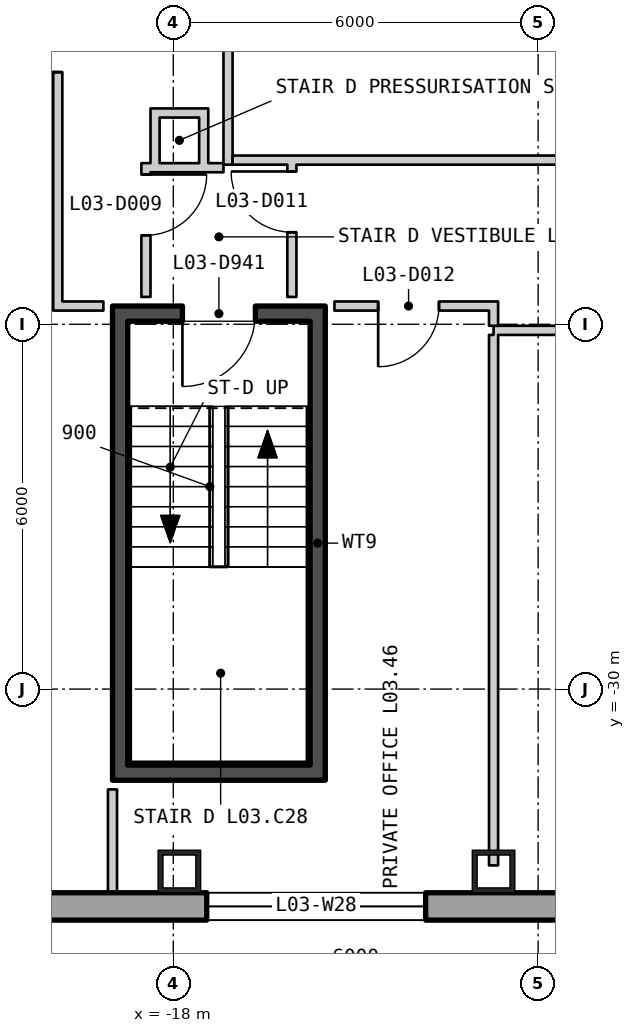
"""IFC4 building model, lengths in metres.
Left out: names, types, materials, properties, quantities, classifications, styles, units other than length and angle.
Written with IfcOpenShell. Run it as: python <this file> out.ifc"""

import sys

from ifc_helpers import new_model, si_unit, direction, frame, frame_2d, origin, origin_2d, place, context, subcontext, project, spatial, polyline, rectangle, hollow_rectangle, outline, extrude, element, fill, save


model = new_model("IFC4")
c1 = context("Model", 3, precision=1e-05, world=origin(), true_north=direction((0.0, 1.0)))
c2 = subcontext(c1, "Body", "Model", "MODEL_VIEW")
j1 = project(units=[si_unit("LENGTHUNIT", "METRE"), si_unit("PLANEANGLEUNIT", "RADIAN")], contexts=[c1])
p1 = place(None, origin())
s1 = spatial("IfcSite", under=j1, at=p1, CompositionType="ELEMENT")
p2 = place(p1, origin())
s2 = spatial("IfcBuilding", under=s1, at=p2, CompositionType="ELEMENT")
p3 = place(p2, frame((0.0, 0.0, 18.6)))
s3 = spatial("IfcBuildingStorey", under=s2, at=p3, CompositionType="ELEMENT", Elevation=18.6)
for number, where, z_axis, x_axis in (
    (1, (-17.9, -33.0, 0.0), (0.0, 0.0, 1.0), (1.0, 0.0, 0.0)),
    (2, (-12.733, -33.0, 0.0), (0.0, 0.0, 1.0), (1.0, 0.0, 0.0)),
):
    element("IfcColumn", number, at=place(p3, frame(where, z_axis=z_axis, x_axis=x_axis)), inside=s3, PredefinedType="COLUMN", context=c2, shape_type="SweptSolid", body=[
        extrude(hollow_rectangle(XDim=0.7, YDim=0.7, WallThickness=0.08, at=origin_2d()), origin(), (0.0, 0.0, 1.0), 5.1),
    ])
p4 = place(p3, frame((-38.775, -33.575, -0.4), z_axis=(0.0, 0.0, 1.0), x_axis=(1.0, 0.0, 0.0)))
e3 = element("IfcWall", 3, at=p4, inside=s3, PredefinedType="SOLIDWALL", context=c2, shape_type="SweptSolid", body=[
    extrude(outline(polyline([(-0.225, -0.225), (77.775, -0.225), (77.325, 0.225), (0.225, 0.225), (-0.225, -0.225)])), origin(), (0.0, 0.0, 1.0), 5.1),
])
p5 = place(p4, frame((1.958, 0.0, 1.3)))
e4 = element("IfcOpeningElement", 4, at=p5, cuts=e3, PredefinedType="OPENING", context=c2, shape_type="SweptSolid", body=[
    extrude(rectangle(XDim=3.6, YDim=3.2, at=frame_2d((1.8, 1.6))), frame((0.0, 0.235, 0.0), z_axis=(0.0, -1.0, 0.0), x_axis=(1.0, 0.0, 0.0)), (0.0, 0.0, 1.0), 0.47),
])
p6 = place(p4, frame((8.325, 0.0, 1.3)))
e5 = element("IfcOpeningElement", 5, at=p6, cuts=e3, PredefinedType="OPENING", context=c2, shape_type="SweptSolid", body=[
    extrude(rectangle(XDim=3.6, YDim=3.2, at=frame_2d((1.8, 1.6))), frame((0.0, 0.235, 0.0), z_axis=(0.0, -1.0, 0.0), x_axis=(1.0, 0.0, 0.0)), (0.0, 0.0, 1.0), 0.47),
])
p7 = place(p4, frame((14.692, 0.0, 1.3)))
e6 = element("IfcOpeningElement", 6, at=p7, cuts=e3, PredefinedType="OPENING", context=c2, shape_type="SweptSolid", body=[
    extrude(rectangle(XDim=3.6, YDim=3.2, at=frame_2d((1.8, 1.6))), frame((0.0, 0.235, 0.0), z_axis=(0.0, -1.0, 0.0), x_axis=(1.0, 0.0, 0.0)), (0.0, 0.0, 1.0), 0.47),
])
p8 = place(p4, frame((21.325, 0.0, 1.3)))
e7 = element("IfcOpeningElement", 7, at=p8, cuts=e3, PredefinedType="OPENING", context=c2, shape_type="SweptSolid", body=[
    extrude(rectangle(XDim=3.6, YDim=3.2, at=frame_2d((1.8, 1.6))), frame((0.0, 0.235, 0.0), z_axis=(0.0, -1.0, 0.0), x_axis=(1.0, 0.0, 0.0)), (0.0, 0.0, 1.0), 0.47),
])
p9 = place(p4, frame((27.425, 0.0, 1.3)))
e8 = element("IfcOpeningElement", 8, at=p9, cuts=e3, PredefinedType="OPENING", context=c2, shape_type="SweptSolid", body=[
    extrude(rectangle(XDim=3.6, YDim=3.2, at=frame_2d((1.8, 1.6))), frame((0.0, 0.235, 0.0), z_axis=(0.0, -1.0, 0.0), x_axis=(1.0, 0.0, 0.0)), (0.0, 0.0, 1.0), 0.47),
])
p10 = place(p4, frame((33.792, 0.0, 1.3)))
e9 = element("IfcOpeningElement", 9, at=p10, cuts=e3, PredefinedType="OPENING", context=c2, shape_type="SweptSolid", body=[
    extrude(rectangle(XDim=3.6, YDim=3.2, at=frame_2d((1.8, 1.6))), frame((0.0, 0.235, 0.0), z_axis=(0.0, -1.0, 0.0), x_axis=(1.0, 0.0, 0.0)), (0.0, 0.0, 1.0), 0.47),
])
p11 = place(p4, frame((40.158, 0.0, 1.3)))
e10 = element("IfcOpeningElement", 10, at=p11, cuts=e3, PredefinedType="OPENING", context=c2, shape_type="SweptSolid", body=[
    extrude(rectangle(XDim=3.6, YDim=3.2, at=frame_2d((1.8, 1.6))), frame((0.0, 0.235, 0.0), z_axis=(0.0, -1.0, 0.0), x_axis=(1.0, 0.0, 0.0)), (0.0, 0.0, 1.0), 0.47),
])
p12 = place(p4, frame((46.525, 0.0, 1.3)))
e11 = element("IfcOpeningElement", 11, at=p12, cuts=e3, PredefinedType="OPENING", context=c2, shape_type="SweptSolid", body=[
    extrude(rectangle(XDim=3.6, YDim=3.2, at=frame_2d((1.8, 1.6))), frame((0.0, 0.235, 0.0), z_axis=(0.0, -1.0, 0.0), x_axis=(1.0, 0.0, 0.0)), (0.0, 0.0, 1.0), 0.47),
])
p13 = place(p4, frame((52.625, 0.0, 1.3)))
e12 = element("IfcOpeningElement", 12, at=p13, cuts=e3, PredefinedType="OPENING", context=c2, shape_type="SweptSolid", body=[
    extrude(rectangle(XDim=3.6, YDim=3.2, at=frame_2d((1.8, 1.6))), frame((0.0, 0.235, 0.0), z_axis=(0.0, -1.0, 0.0), x_axis=(1.0, 0.0, 0.0)), (0.0, 0.0, 1.0), 0.47),
])
p14 = place(p4, frame((59.258, 0.0, 1.3)))
e13 = element("IfcOpeningElement", 13, at=p14, cuts=e3, PredefinedType="OPENING", context=c2, shape_type="SweptSolid", body=[
    extrude(rectangle(XDim=3.6, YDim=3.2, at=frame_2d((1.8, 1.6))), frame((0.0, 0.235, 0.0), z_axis=(0.0, -1.0, 0.0), x_axis=(1.0, 0.0, 0.0)), (0.0, 0.0, 1.0), 0.47),
])
p15 = place(p4, frame((65.625, 0.0, 1.3)))
e14 = element("IfcOpeningElement", 14, at=p15, cuts=e3, PredefinedType="OPENING", context=c2, shape_type="SweptSolid", body=[
    extrude(rectangle(XDim=3.6, YDim=3.2, at=frame_2d((1.8, 1.6))), frame((0.0, 0.235, 0.0), z_axis=(0.0, -1.0, 0.0), x_axis=(1.0, 0.0, 0.0)), (0.0, 0.0, 1.0), 0.47),
])
p16 = place(p4, frame((71.992, 0.0, 1.3)))
e15 = element("IfcOpeningElement", 15, at=p16, cuts=e3, PredefinedType="OPENING", context=c2, shape_type="SweptSolid", body=[
    extrude(rectangle(XDim=3.6, YDim=3.2, at=frame_2d((1.8, 1.6))), frame((0.0, 0.235, 0.0), z_axis=(0.0, -1.0, 0.0), x_axis=(1.0, 0.0, 0.0)), (0.0, 0.0, 1.0), 0.47),
])
for number, where, z_axis, x_axis in (
    (16, (-18.875, -31.25, 0.0), (0.0, 0.0, 1.0), (0.0, 1.0, 0.0)),
    (17, (-15.625, -31.25, 0.0), (0.0, 0.0, 1.0), (0.0, 1.0, 0.0)),
):
    element("IfcWall", number, at=place(p3, frame(where, z_axis=z_axis, x_axis=x_axis)), inside=s3, PredefinedType="SHEAR", context=c2, shape_type="SweptSolid", body=[
        extrude(rectangle(XDim=7.3, YDim=0.25, at=frame_2d((3.65, 0.0))), origin(), (0.0, 0.0, 1.0), 4.88),
    ])
p17 = place(p3, frame((-19.0, -31.375, 0.0), z_axis=(0.0, 0.0, 1.0), x_axis=(1.0, 0.0, 0.0)))
e18 = element("IfcWall", 18, at=p17, inside=s3, PredefinedType="SHEAR", context=c2, shape_type="SweptSolid", body=[
    extrude(rectangle(XDim=3.5, YDim=0.25, at=frame_2d((1.75, 0.0))), origin(), (0.0, 0.0, 1.0), 4.88),
])
p18 = place(p3, frame((-19.0, -23.825, 0.0), z_axis=(0.0, 0.0, 1.0), x_axis=(1.0, 0.0, 0.0)))
e19 = element("IfcWall", 19, at=p18, inside=s3, PredefinedType="SHEAR", context=c2, shape_type="SweptSolid", body=[
    extrude(rectangle(XDim=3.5, YDim=0.25, at=frame_2d((1.75, 0.0))), origin(), (0.0, 0.0, 1.0), 4.88),
])
p19 = place(p18, frame((1.15, 0.0, 0.0)))
e20 = element("IfcOpeningElement", 20, at=p19, cuts=e19, PredefinedType="OPENING", context=c2, shape_type="SweptSolid", body=[
    extrude(rectangle(XDim=1.2, YDim=2.1, at=frame_2d((0.6, 1.05))), frame((0.0, 0.135, 0.0), z_axis=(0.0, -1.0, 0.0), x_axis=(1.0, 0.0, 0.0)), (0.0, 0.0, 1.0), 0.27),
])
p20 = place(p3, frame((-25.026, -19.825, 0.0), z_axis=(0.0, 0.0, 1.0), x_axis=(0.707106781187, 0.707106781187, 0.0)))
e21 = element("IfcWall", 21, at=p20, inside=s3, PredefinedType="PARTITIONING", context=c2, shape_type="SweptSolid", body=[
    extrude(rectangle(XDim=7.068, YDim=0.15, at=frame_2d((3.534, 0.0))), origin(), (0.0, 0.0, 1.0), 4.88),
])
p21 = place(p3, frame((-19.9, -23.775, 0.0), z_axis=(0.0, 0.0, 1.0), x_axis=(0.0, 1.0, 0.0)))
e22 = element("IfcWall", 22, at=p21, inside=s3, PredefinedType="PARTITIONING", context=c2, shape_type="SweptSolid", body=[
    extrude(rectangle(XDim=21.187, YDim=0.15, at=frame_2d((10.594, 0.0))), origin(), (0.0, 0.0, 1.0), 4.88),
])
p22 = place(p21, frame((3.922, 0.0, 0.0)))
e23 = element("IfcOpeningElement", 23, at=p22, cuts=e22, PredefinedType="OPENING", context=c2, shape_type="SweptSolid", body=[
    extrude(rectangle(XDim=1.0, YDim=2.1, at=frame_2d((0.5, 1.05))), frame((0.0, 0.085, 0.0), z_axis=(0.0, -1.0, 0.0), x_axis=(1.0, 0.0, 0.0)), (0.0, 0.0, 1.0), 0.17),
])
p23 = place(p21, frame((12.423, 0.0, 0.0)))
e24 = element("IfcOpeningElement", 24, at=p23, cuts=e22, PredefinedType="OPENING", context=c2, shape_type="SweptSolid", body=[
    extrude(rectangle(XDim=1.0, YDim=2.1, at=frame_2d((0.5, 1.05))), frame((0.0, 0.085, 0.0), z_axis=(0.0, -1.0, 0.0), x_axis=(1.0, 0.0, 0.0)), (0.0, 0.0, 1.0), 0.17),
])
p24 = place(p3, frame((-19.825, -23.7, 0.0), z_axis=(0.0, 0.0, 1.0), x_axis=(1.0, 0.0, 0.0)))
e25 = element("IfcWall", 25, at=p24, inside=s3, PredefinedType="PARTITIONING", context=c2, shape_type="SweptSolid", body=[
    extrude(rectangle(XDim=0.675, YDim=0.15, at=frame_2d((0.338, 0.0))), origin(), (0.0, 0.0, 1.0), 4.88),
])
p25 = place(p3, frame((-19.0, -33.348, 0.0), z_axis=(0.0, 0.0, 1.0), x_axis=(0.0, 1.0, 0.0)))
e26 = element("IfcWall", 26, at=p25, inside=s3, PredefinedType="PARTITIONING", context=c2, shape_type="SweptSolid", body=[
    extrude(rectangle(XDim=0.448, YDim=0.15, at=frame_2d((0.224, 0.0))), origin(), (0.0, 0.0, 1.0), 4.88),
])
p26 = place(p3, frame((-19.0, -32.9, 0.0), z_axis=(0.0, 0.0, 1.0), x_axis=(0.0, 1.0, 0.0)))
e27 = element("IfcWall", 27, at=p26, inside=s3, PredefinedType="PARTITIONING", context=c2, shape_type="SweptSolid", body=[
    extrude(rectangle(XDim=1.25, YDim=0.15, at=frame_2d((0.625, 0.0))), origin(), (0.0, 0.0, 1.0), 4.19),
])
p27 = place(p3, frame((-18.45, -23.55, 0.0), z_axis=(0.0, 0.0, 1.0), x_axis=(0.0, 1.0, 0.0)))
e28 = element("IfcWall", 28, at=p27, inside=s3, PredefinedType="PARTITIONING", context=c2, shape_type="SweptSolid", body=[
    extrude(rectangle(XDim=2.2, YDim=0.15, at=frame_2d((1.1, 0.0))), origin(), (0.0, 0.0, 1.0), 4.88),
])
p28 = place(p27, frame((1.013, 0.0, 0.0)))
e29 = element("IfcOpeningElement", 29, at=p28, cuts=e28, PredefinedType="OPENING", context=c2, shape_type="SweptSolid", body=[
    extrude(rectangle(XDim=1.0, YDim=2.1, at=frame_2d((0.5, 1.05))), frame((0.0, 0.085, 0.0), z_axis=(0.0, -1.0, 0.0), x_axis=(1.0, 0.0, 0.0)), (0.0, 0.0, 1.0), 0.17),
])
p29 = place(p3, frame((-18.3, -21.5, 0.0), z_axis=(0.0, 0.0, 1.0), x_axis=(0.0, 1.0, 0.0)))
e30 = element("IfcWall", 30, at=p29, inside=s3, PredefinedType="PARTITIONING", context=c2, shape_type="SweptSolid", body=[
    extrude(rectangle(XDim=1.05, YDim=0.15, at=frame_2d((0.525, 0.0))), origin(), (0.0, 0.0, 1.0), 4.88),
])
for number, where, z_axis, x_axis in (
    (31, (-18.225, -21.425, 0.0), (0.0, 0.0, 1.0), (1.0, 0.0, 0.0)),
    (32, (-18.225, -20.525, 0.0), (0.0, 0.0, 1.0), (1.0, 0.0, 0.0)),
):
    element("IfcWall", number, at=place(p3, frame(where, z_axis=z_axis, x_axis=x_axis)), inside=s3, PredefinedType="PARTITIONING", context=c2, shape_type="SweptSolid", body=[
        extrude(rectangle(XDim=0.65, YDim=0.15, at=frame_2d((0.325, 0.0))), origin(), (0.0, 0.0, 1.0), 4.88),
    ])
p30 = place(p3, frame((-17.5, -21.5, 0.0), z_axis=(0.0, 0.0, 1.0), x_axis=(0.0, 1.0, 0.0)))
e33 = element("IfcWall", 33, at=p30, inside=s3, PredefinedType="PARTITIONING", context=c2, shape_type="SweptSolid", body=[
    extrude(rectangle(XDim=1.05, YDim=0.15, at=frame_2d((0.525, 0.0))), origin(), (0.0, 0.0, 1.0), 4.88),
])
p31 = place(p3, frame((-17.425, -21.425, 0.0), z_axis=(0.0, 0.0, 1.0), x_axis=(1.0, 0.0, 0.0)))
e34 = element("IfcWall", 34, at=p31, inside=s3, PredefinedType="PARTITIONING", context=c2, shape_type="SweptSolid", body=[
    extrude(rectangle(XDim=0.25, YDim=0.15, at=frame_2d((0.125, 0.0))), origin(), (0.0, 0.0, 1.0), 4.88),
])
p32 = place(p3, frame((-17.1, -21.375, 0.0), z_axis=(0.0, 0.0, 1.0), x_axis=(0.0, 1.0, 0.0)))
e35 = element("IfcWall", 35, at=p32, inside=s3, PredefinedType="PARTITIONING", context=c2, shape_type="SweptSolid", body=[
    extrude(rectangle(XDim=19.05, YDim=0.15, at=frame_2d((9.525, 0.0))), origin(), (0.0, 0.0, 1.0), 4.88),
])
p33 = place(p3, frame((-17.025, -21.3, 0.0), z_axis=(0.0, 0.0, 1.0), x_axis=(1.0, 0.0, 0.0)))
e36 = element("IfcWall", 36, at=p33, inside=s3, PredefinedType="PARTITIONING", context=c2, shape_type="SweptSolid", body=[
    extrude(rectangle(XDim=10.655, YDim=0.15, at=frame_2d((5.327, 0.0))), origin(), (0.0, 0.0, 1.0), 4.88),
])
p34 = place(p3, frame((-16.05, -23.55, 0.0), z_axis=(0.0, 0.0, 1.0), x_axis=(0.0, 1.0, 0.0)))
e37 = element("IfcWall", 37, at=p34, inside=s3, PredefinedType="PARTITIONING", context=c2, shape_type="SweptSolid", body=[
    extrude(rectangle(XDim=2.175, YDim=0.15, at=frame_2d((1.087, 0.0))), origin(), (0.0, 0.0, 1.0), 4.88),
])
p35 = place(p34, frame((1.063, 0.0, 0.0)))
e38 = element("IfcOpeningElement", 38, at=p35, cuts=e37, PredefinedType="OPENING", context=c2, shape_type="SweptSolid", body=[
    extrude(rectangle(XDim=1.0, YDim=2.1, at=frame_2d((0.5, 1.05))), frame((0.0, 0.085, 0.0), z_axis=(0.0, -1.0, 0.0), x_axis=(1.0, 0.0, 0.0)), (0.0, 0.0, 1.0), 0.17),
])
p36 = place(p3, frame((-15.35, -23.7, 0.0), z_axis=(0.0, 0.0, 1.0), x_axis=(1.0, 0.0, 0.0)))
e39 = element("IfcWall", 39, at=p36, inside=s3, PredefinedType="PARTITIONING", context=c2, shape_type="SweptSolid", body=[
    extrude(rectangle(XDim=2.542, YDim=0.15, at=frame_2d((1.271, 0.0))), origin(), (0.0, 0.0, 1.0), 4.88),
])
p37 = place(p36, frame((0.719, 0.0, 0.0)))
e40 = element("IfcOpeningElement", 40, at=p37, cuts=e39, PredefinedType="OPENING", context=c2, shape_type="SweptSolid", body=[
    extrude(rectangle(XDim=1.0, YDim=2.1, at=frame_2d((0.5, 1.05))), frame((0.0, 0.085, 0.0), z_axis=(0.0, -1.0, 0.0), x_axis=(1.0, 0.0, 0.0)), (0.0, 0.0, 1.0), 0.17),
])
p38 = place(p3, frame((-12.733, -32.9, 0.0), z_axis=(0.0, 0.0, 1.0), x_axis=(0.0, 1.0, 0.0)))
e41 = element("IfcWall", 41, at=p38, inside=s3, PredefinedType="PARTITIONING", context=c2, shape_type="SweptSolid", body=[
    extrude(rectangle(XDim=8.725, YDim=0.15, at=frame_2d((4.362, 0.0))), origin(), (0.0, 0.0, 1.0), 4.19),
])
p39 = place(p3, frame((-12.733, -24.1, 0.0), z_axis=(0.0, 0.0, 1.0), x_axis=(1.0, 0.0, 0.0)))
e42 = element("IfcWall", 42, at=p39, inside=s3, PredefinedType="PARTITIONING", context=c2, shape_type="SweptSolid", body=[
    extrude(rectangle(XDim=19.1, YDim=0.15, at=frame_2d((9.55, 0.0))), origin(), (0.0, 0.0, 1.0), 4.88),
])
p40 = place(p39, frame((8.807, 0.0, 0.0)))
e43 = element("IfcOpeningElement", 43, at=p40, cuts=e42, PredefinedType="OPENING", context=c2, shape_type="SweptSolid", body=[
    extrude(rectangle(XDim=1.0, YDim=2.1, at=frame_2d((0.5, 1.05))), frame((0.0, 0.085, 0.0), z_axis=(0.0, -1.0, 0.0), x_axis=(1.0, 0.0, 0.0)), (0.0, 0.0, 1.0), 0.17),
])
p41 = place(p3, frame((-12.733, -24.025, 0.0), z_axis=(0.0, 0.0, 1.0), x_axis=(0.0, 1.0, 0.0)))
e44 = element("IfcWall", 44, at=p41, inside=s3, PredefinedType="PARTITIONING", context=c2, shape_type="SweptSolid", body=[
    extrude(rectangle(XDim=0.4, YDim=0.15, at=frame_2d((0.2, 0.0))), origin(), (0.0, 0.0, 1.0), 4.88),
])
p42 = place(p8, origin())
e45 = element("IfcWindow", 45, at=p42, inside=s3, PartitioningType="SINGLE_PANEL", PredefinedType="WINDOW", context=c2, shape_type="SweptSolid", body=[
    extrude(rectangle(XDim=3.6, YDim=3.2, at=frame_2d((1.8, 1.6))), frame((0.0, 0.105, 0.0), z_axis=(0.0, -1.0, 0.0), x_axis=(1.0, 0.0, 0.0)), (0.0, 0.0, 1.0), 0.06),
])
fill(e7, e45)
p43 = place(p19, origin())
e46 = element("IfcDoor", 46, at=p43, inside=s3, OperationType="SINGLE_SWING_LEFT", PredefinedType="DOOR", context=c2, shape_type="SweptSolid", body=[
    extrude(rectangle(XDim=1.2, YDim=2.1, at=frame_2d((0.6, 1.05))), frame((0.0, 0.025, 0.0), z_axis=(0.0, -1.0, 0.0), x_axis=(1.0, 0.0, 0.0)), (0.0, 0.0, 1.0), 0.05),
])
fill(e20, e46)
p44 = place(p22, origin())
e47 = element("IfcDoor", 47, at=p44, inside=s3, OperationType="SINGLE_SWING_RIGHT", PredefinedType="DOOR", context=c2, shape_type="SweptSolid", body=[
    extrude(rectangle(XDim=1.0, YDim=2.1, at=frame_2d((0.5, 1.05))), frame((0.0, 0.025, 0.0), z_axis=(0.0, -1.0, 0.0), x_axis=(1.0, 0.0, 0.0)), (0.0, 0.0, 1.0), 0.05),
])
fill(e23, e47)
p45 = place(p28, origin())
e48 = element("IfcDoor", 48, at=p45, inside=s3, OperationType="SINGLE_SWING_RIGHT", PredefinedType="DOOR", context=c2, shape_type="SweptSolid", body=[
    extrude(rectangle(XDim=1.0, YDim=2.1, at=frame_2d((0.5, 1.05))), frame((0.0, 0.025, 0.0), z_axis=(0.0, -1.0, 0.0), x_axis=(1.0, 0.0, 0.0)), (0.0, 0.0, 1.0), 0.05),
])
fill(e29, e48)
p46 = place(p35, origin())
e49 = element("IfcDoor", 49, at=p46, inside=s3, OperationType="SINGLE_SWING_LEFT", PredefinedType="DOOR", context=c2, shape_type="SweptSolid", body=[
    extrude(rectangle(XDim=1.0, YDim=2.1, at=frame_2d((0.5, 1.05))), frame((0.0, 0.025, 0.0), z_axis=(0.0, -1.0, 0.0), x_axis=(1.0, 0.0, 0.0)), (0.0, 0.0, 1.0), 0.05),
])
fill(e38, e49)
p47 = place(p37, origin())
e50 = element("IfcDoor", 50, at=p47, inside=s3, OperationType="SINGLE_SWING_LEFT", PredefinedType="DOOR", context=c2, shape_type="SweptSolid", body=[
    extrude(rectangle(XDim=1.0, YDim=2.1, at=frame_2d((0.5, 1.05))), frame((0.0, 0.025, 0.0), z_axis=(0.0, -1.0, 0.0), x_axis=(1.0, 0.0, 0.0)), (0.0, 0.0, 1.0), 0.05),
])
fill(e40, e50)
save(model, sys.argv[1])
